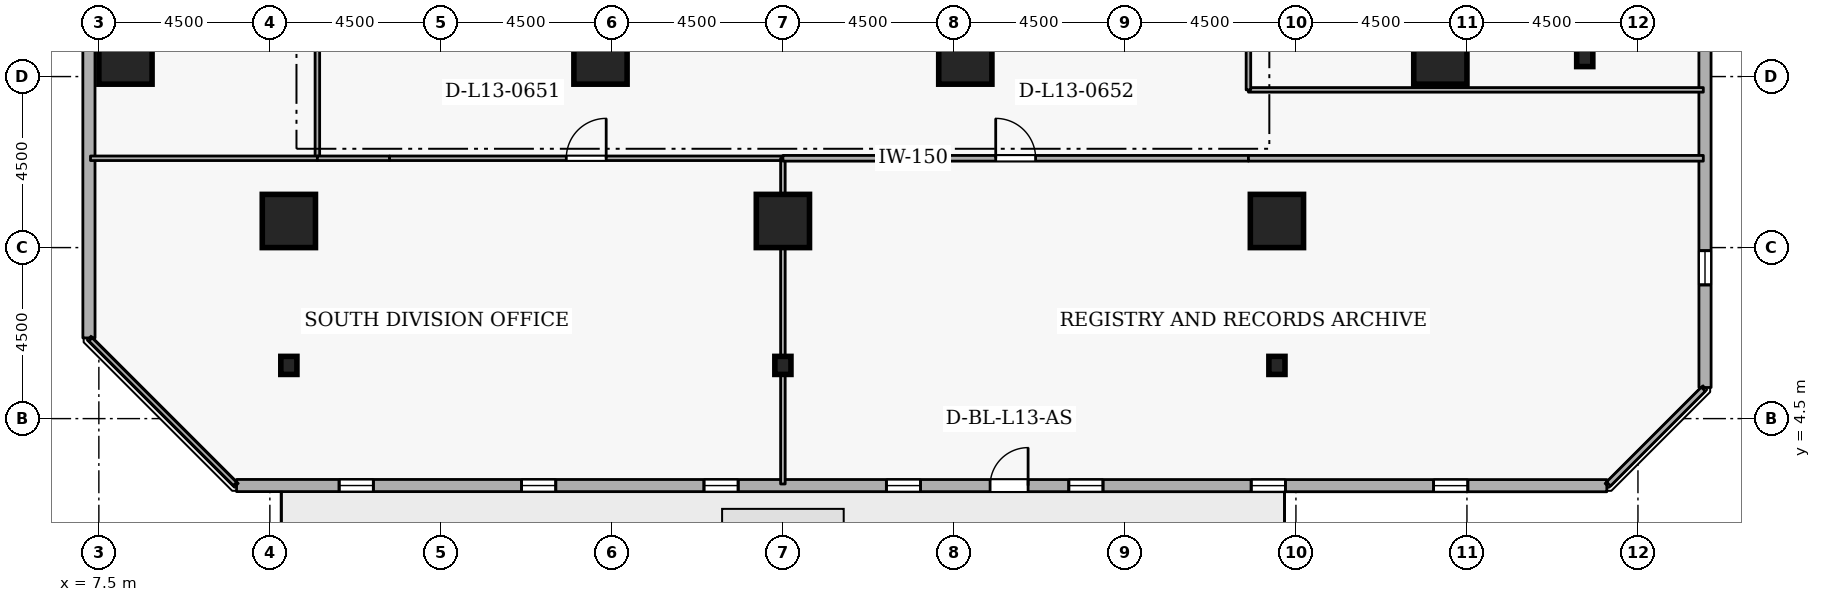
"""IFC4 building model, lengths in metres.
Left out: names, types, materials, properties, quantities, classifications, styles, units other than length and angle.
Written with IfcOpenShell. Run it as: python <this file> out.ifc"""

import sys

from ifc_helpers import new_model, si_unit, direction, frame, frame_2d, origin, origin_2d, place, context, subcontext, project, spatial, rectangle, i_section, extrude, element, fill, save


model = new_model("IFC4")
c1 = context("Model", 3, precision=1e-05, world=origin(), true_north=direction((0.0, 1.0)))
c2 = subcontext(c1, "Body", "Model", "MODEL_VIEW")
j1 = project(units=[si_unit("LENGTHUNIT", "METRE"), si_unit("PLANEANGLEUNIT", "RADIAN")], contexts=[c1])
p1 = place(None, origin())
s1 = spatial("IfcSite", under=j1, at=p1, CompositionType="ELEMENT")
p2 = place(p1, origin())
s2 = spatial("IfcBuilding", under=s1, at=p2, CompositionType="ELEMENT")
p3 = place(p2, frame((0.0, 0.0, 53.7)))
s3 = spatial("IfcBuildingStorey", under=s2, at=p3, CompositionType="ELEMENT", Elevation=53.7)
for number, where, z_axis, x_axis in (
    (1, (12.5, 9.7, 0.0), (0.0, 0.0, 1.0), (1.0, 0.0, 0.0)),
    (2, (25.5, 9.7, 0.0), (0.0, 0.0, 1.0), (1.0, 0.0, 0.0)),
    (3, (38.5, 9.7, 0.0), (0.0, 0.0, 1.0), (1.0, 0.0, 0.0)),
    (4, (42.8, 14.0, 0.0), (0.0, 0.0, 1.0), (1.0, 0.0, 0.0)),
    (5, (8.2, 14.0, 0.0), (0.0, 0.0, 1.0), (1.0, 0.0, 0.0)),
    (6, (20.7, 14.0, 0.0), (0.0, 0.0, 1.0), (1.0, 0.0, 0.0)),
    (7, (30.3, 14.0, 0.0), (0.0, 0.0, 1.0), (1.0, 0.0, 0.0)),
):
    element("IfcColumn", number, at=place(p3, frame(where, z_axis=z_axis, x_axis=x_axis)), inside=s3, PredefinedType="COLUMN", context=c2, shape_type="SweptSolid", body=[
        extrude(rectangle(XDim=1.4, YDim=1.4, at=origin_2d()), origin(), (0.0, 0.0, 1.0), 3.6),
    ])
for number, where, z_axis, x_axis in (
    (8, (12.5, 5.9, 0.0), (0.0, 0.0, 1.0), (1.0, 0.0, 0.0)),
    (9, (25.5, 5.9, 0.0), (0.0, 0.0, 1.0), (1.0, 0.0, 0.0)),
    (10, (38.5, 5.9, 0.0), (0.0, 0.0, 1.0), (1.0, 0.0, 0.0)),
    (11, (46.6, 14.0, 0.0), (0.0, 0.0, 1.0), (1.0, 0.0, 0.0)),
):
    element("IfcColumn", number, at=place(p3, frame(where, z_axis=z_axis, x_axis=x_axis)), inside=s3, PredefinedType="COLUMN", context=c2, shape_type="SweptSolid", body=[
        extrude(i_section(OverallWidth=0.424, OverallDepth=0.475, WebThickness=0.048, FlangeThickness=0.077, FilletRadius=0.015, at=origin_2d()), origin(), (0.0, 0.0, 1.0), 3.6),
    ])
p4 = place(p3, frame((11.123, 2.74, 0.0), z_axis=(0.0, 0.0, 1.0), x_axis=(0.999999992574, -0.000121872777, 0.0)))
e12 = element("IfcWall", 12, at=p4, inside=s3, PredefinedType="STANDARD", context=c2, shape_type="SweptSolid", body=[
    extrude(rectangle(XDim=36.058, YDim=0.32, at=frame_2d((18.029, 0.0))), origin(), (0.0, 0.0, 1.0), 2.7),
])
p5 = place(p4, frame((19.829, 0.0, 0.0)))
e13 = element("IfcOpeningElement", 13, at=p5, cuts=e12, PredefinedType="OPENING", context=c2, shape_type="SweptSolid", body=[
    extrude(rectangle(XDim=1.0, YDim=2.08, at=frame_2d((0.5, 1.04))), frame((0.0, 0.17, 0.0), z_axis=(0.0, -1.0, 0.0), x_axis=(1.0, 0.0, 0.0)), (0.0, 0.0, 1.0), 0.34),
])
p6 = place(p4, frame((2.7, 0.0, 0.72)))
e14 = element("IfcOpeningElement", 14, at=p6, cuts=e12, PredefinedType="OPENING", context=c2, shape_type="SweptSolid", body=[
    extrude(rectangle(XDim=0.9, YDim=1.75, at=frame_2d((0.45, 0.875))), frame((0.0, 0.17, 0.0), z_axis=(0.0, -1.0, 0.0), x_axis=(1.0, 0.0, 0.0)), (0.0, 0.0, 1.0), 0.34),
])
p7 = place(p4, frame((7.5, 0.0, 0.72)))
e15 = element("IfcOpeningElement", 15, at=p7, cuts=e12, PredefinedType="OPENING", context=c2, shape_type="SweptSolid", body=[
    extrude(rectangle(XDim=0.9, YDim=1.75, at=frame_2d((0.45, 0.875))), frame((0.0, 0.17, 0.0), z_axis=(0.0, -1.0, 0.0), x_axis=(1.0, 0.0, 0.0)), (0.0, 0.0, 1.0), 0.34),
])
p8 = place(p4, frame((12.3, 0.0, 0.72)))
e16 = element("IfcOpeningElement", 16, at=p8, cuts=e12, PredefinedType="OPENING", context=c2, shape_type="SweptSolid", body=[
    extrude(rectangle(XDim=0.9, YDim=1.75, at=frame_2d((0.45, 0.875))), frame((0.0, 0.17, 0.0), z_axis=(0.0, -1.0, 0.0), x_axis=(1.0, 0.0, 0.0)), (0.0, 0.0, 1.0), 0.34),
])
p9 = place(p4, frame((17.1, 0.0, 0.72)))
e17 = element("IfcOpeningElement", 17, at=p9, cuts=e12, PredefinedType="OPENING", context=c2, shape_type="SweptSolid", body=[
    extrude(rectangle(XDim=0.9, YDim=1.75, at=frame_2d((0.45, 0.875))), frame((0.0, 0.17, 0.0), z_axis=(0.0, -1.0, 0.0), x_axis=(1.0, 0.0, 0.0)), (0.0, 0.0, 1.0), 0.34),
])
p10 = place(p4, frame((21.9, 0.0, 0.72)))
e18 = element("IfcOpeningElement", 18, at=p10, cuts=e12, PredefinedType="OPENING", context=c2, shape_type="SweptSolid", body=[
    extrude(rectangle(XDim=0.9, YDim=1.75, at=frame_2d((0.45, 0.875))), frame((0.0, 0.17, 0.0), z_axis=(0.0, -1.0, 0.0), x_axis=(1.0, 0.0, 0.0)), (0.0, 0.0, 1.0), 0.34),
])
p11 = place(p4, frame((26.7, 0.0, 0.72)))
e19 = element("IfcOpeningElement", 19, at=p11, cuts=e12, PredefinedType="OPENING", context=c2, shape_type="SweptSolid", body=[
    extrude(rectangle(XDim=0.9, YDim=1.75, at=frame_2d((0.45, 0.875))), frame((0.0, 0.17, 0.0), z_axis=(0.0, -1.0, 0.0), x_axis=(1.0, 0.0, 0.0)), (0.0, 0.0, 1.0), 0.34),
])
p12 = place(p4, frame((31.5, 0.0, 0.72)))
e20 = element("IfcOpeningElement", 20, at=p12, cuts=e12, PredefinedType="OPENING", context=c2, shape_type="SweptSolid", body=[
    extrude(rectangle(XDim=0.9, YDim=1.75, at=frame_2d((0.45, 0.875))), frame((0.0, 0.17, 0.0), z_axis=(0.0, -1.0, 0.0), x_axis=(1.0, 0.0, 0.0)), (0.0, 0.0, 1.0), 0.34),
])
p13 = place(p3, frame((49.765, 5.319, 0.0), z_axis=(0.0, 0.0, 1.0), x_axis=(-0.000121872777, 0.999999992574, 0.0)))
e21 = element("IfcWall", 21, at=p13, inside=s3, PredefinedType="STANDARD", context=c2, shape_type="SweptSolid", body=[
    extrude(rectangle(XDim=36.058, YDim=0.32, at=frame_2d((18.029, 0.0))), origin(), (0.0, 0.0, 1.0), 2.7),
])
p14 = place(p13, frame((2.7, 0.0, 0.72)))
e22 = element("IfcOpeningElement", 22, at=p14, cuts=e21, PredefinedType="OPENING", context=c2, shape_type="SweptSolid", body=[
    extrude(rectangle(XDim=0.9, YDim=1.75, at=frame_2d((0.45, 0.875))), frame((0.0, 0.17, 0.0), z_axis=(0.0, -1.0, 0.0), x_axis=(1.0, 0.0, 0.0)), (0.0, 0.0, 1.0), 0.34),
])
p15 = place(p13, frame((12.3, 0.0, 0.72)))
e23 = element("IfcOpeningElement", 23, at=p15, cuts=e21, PredefinedType="OPENING", context=c2, shape_type="SweptSolid", body=[
    extrude(rectangle(XDim=0.9, YDim=1.75, at=frame_2d((0.45, 0.875))), frame((0.0, 0.17, 0.0), z_axis=(0.0, -1.0, 0.0), x_axis=(1.0, 0.0, 0.0)), (0.0, 0.0, 1.0), 0.34),
])
p16 = place(p13, frame((17.1, 0.0, 0.72)))
e24 = element("IfcOpeningElement", 24, at=p16, cuts=e21, PredefinedType="OPENING", context=c2, shape_type="SweptSolid", body=[
    extrude(rectangle(XDim=0.9, YDim=1.75, at=frame_2d((0.45, 0.875))), frame((0.0, 0.17, 0.0), z_axis=(0.0, -1.0, 0.0), x_axis=(1.0, 0.0, 0.0)), (0.0, 0.0, 1.0), 0.34),
])
p17 = place(p13, frame((26.7, 0.0, 0.72)))
e25 = element("IfcOpeningElement", 25, at=p17, cuts=e21, PredefinedType="OPENING", context=c2, shape_type="SweptSolid", body=[
    extrude(rectangle(XDim=0.9, YDim=1.75, at=frame_2d((0.45, 0.875))), frame((0.0, 0.17, 0.0), z_axis=(0.0, -1.0, 0.0), x_axis=(1.0, 0.0, 0.0)), (0.0, 0.0, 1.0), 0.34),
])
p18 = place(p13, frame((31.5, 0.0, 0.72)))
e26 = element("IfcOpeningElement", 26, at=p18, cuts=e21, PredefinedType="OPENING", context=c2, shape_type="SweptSolid", body=[
    extrude(rectangle(XDim=0.9, YDim=1.75, at=frame_2d((0.45, 0.875))), frame((0.0, 0.17, 0.0), z_axis=(0.0, -1.0, 0.0), x_axis=(1.0, 0.0, 0.0)), (0.0, 0.0, 1.0), 0.34),
])
p19 = place(p3, frame((7.235, 42.681, 0.0), z_axis=(0.0, 0.0, 1.0), x_axis=(0.000121872777, -0.999999992574, 0.0)))
e27 = element("IfcWall", 27, at=p19, inside=s3, PredefinedType="STANDARD", context=c2, shape_type="SweptSolid", body=[
    extrude(rectangle(XDim=36.058, YDim=0.32, at=frame_2d((18.029, 0.0))), origin(), (0.0, 0.0, 1.0), 2.7),
])
p20 = place(p19, frame((7.5, 0.0, 0.72)))
e28 = element("IfcOpeningElement", 28, at=p20, cuts=e27, PredefinedType="OPENING", context=c2, shape_type="SweptSolid", body=[
    extrude(rectangle(XDim=0.9, YDim=1.75, at=frame_2d((0.45, 0.875))), frame((0.0, 0.17, 0.0), z_axis=(0.0, -1.0, 0.0), x_axis=(1.0, 0.0, 0.0)), (0.0, 0.0, 1.0), 0.34),
])
p21 = place(p19, frame((12.3, 0.0, 0.72)))
e29 = element("IfcOpeningElement", 29, at=p21, cuts=e27, PredefinedType="OPENING", context=c2, shape_type="SweptSolid", body=[
    extrude(rectangle(XDim=0.9, YDim=1.75, at=frame_2d((0.45, 0.875))), frame((0.0, 0.17, 0.0), z_axis=(0.0, -1.0, 0.0), x_axis=(1.0, 0.0, 0.0)), (0.0, 0.0, 1.0), 0.34),
])
p22 = place(p19, frame((17.1, 0.0, 0.72)))
e30 = element("IfcOpeningElement", 30, at=p22, cuts=e27, PredefinedType="OPENING", context=c2, shape_type="SweptSolid", body=[
    extrude(rectangle(XDim=0.9, YDim=1.75, at=frame_2d((0.45, 0.875))), frame((0.0, 0.17, 0.0), z_axis=(0.0, -1.0, 0.0), x_axis=(1.0, 0.0, 0.0)), (0.0, 0.0, 1.0), 0.34),
])
p23 = place(p19, frame((21.9, 0.0, 0.72)))
e31 = element("IfcOpeningElement", 31, at=p23, cuts=e27, PredefinedType="OPENING", context=c2, shape_type="SweptSolid", body=[
    extrude(rectangle(XDim=0.9, YDim=1.75, at=frame_2d((0.45, 0.875))), frame((0.0, 0.17, 0.0), z_axis=(0.0, -1.0, 0.0), x_axis=(1.0, 0.0, 0.0)), (0.0, 0.0, 1.0), 0.34),
])
p24 = place(p19, frame((26.7, 0.0, 0.72)))
e32 = element("IfcOpeningElement", 32, at=p24, cuts=e27, PredefinedType="OPENING", context=c2, shape_type="SweptSolid", body=[
    extrude(rectangle(XDim=0.9, YDim=1.75, at=frame_2d((0.45, 0.875))), frame((0.0, 0.17, 0.0), z_axis=(0.0, -1.0, 0.0), x_axis=(1.0, 0.0, 0.0)), (0.0, 0.0, 1.0), 0.34),
])
p25 = place(p3, frame((13.25, 20.7, 0.0), z_axis=(0.0, 0.0, 1.0), x_axis=(0.0, -1.0, 0.0)))
e33 = element("IfcWall", 33, at=p25, inside=s3, PredefinedType="PARTITIONING", context=c2, shape_type="SweptSolid", body=[
    extrude(rectangle(XDim=9.35, YDim=0.12, at=frame_2d((4.675, 0.0))), origin(), (0.0, 0.0, 1.0), 3.34),
])
p26 = place(p25, frame((4.15, 0.0, 0.0)))
e34 = element("IfcOpeningElement", 34, at=p26, cuts=e33, PredefinedType="OPENING", context=c2, shape_type="SweptSolid", body=[
    extrude(rectangle(XDim=1.05, YDim=2.1, at=frame_2d((0.525, 1.05))), frame((0.0, 0.07, 0.0), z_axis=(0.0, -1.0, 0.0), x_axis=(1.0, 0.0, 0.0)), (0.0, 0.0, 1.0), 0.14),
])
p27 = place(p3, frame((13.25, 11.35, 0.0), z_axis=(0.0, 0.0, 1.0), x_axis=(-1.0, 0.0, 0.0)))
e35 = element("IfcWall", 35, at=p27, inside=s3, PredefinedType="PARTITIONING", context=c2, shape_type="SweptSolid", body=[
    extrude(rectangle(XDim=5.97, YDim=0.12, at=frame_2d((2.985, 0.0))), origin(), (0.0, 0.0, 1.0), 3.34),
])
p28 = place(p3, frame((49.72, 13.15, 0.0), z_axis=(0.0, 0.0, 1.0), x_axis=(-1.0, 0.0, 0.0)))
e36 = element("IfcWall", 36, at=p28, inside=s3, PredefinedType="PARTITIONING", context=c2, shape_type="SweptSolid", body=[
    extrude(rectangle(XDim=11.97, YDim=0.12, at=frame_2d((5.985, 0.0))), origin(), (0.0, 0.0, 1.0), 3.34),
])
p29 = place(p3, frame((37.75, 13.15, 0.0), z_axis=(0.0, 0.0, 1.0), x_axis=(0.0, 1.0, 0.0)))
e37 = element("IfcWall", 37, at=p29, inside=s3, PredefinedType="PARTITIONING", context=c2, shape_type="SweptSolid", body=[
    extrude(rectangle(XDim=1.862, YDim=0.12, at=frame_2d((0.931, 0.0))), origin(), (0.0, 0.0, 1.0), 3.34),
])
p30 = place(p3, frame((13.25, 11.35, 0.0), z_axis=(0.0, 0.0, 1.0), x_axis=(1.0, 0.0, 0.0)))
e38 = element("IfcWall", 38, at=p30, inside=s3, PredefinedType="PARTITIONING", context=c2, shape_type="SweptSolid", body=[
    extrude(rectangle(XDim=1.9, YDim=0.12, at=frame_2d((0.95, 0.0))), origin(), (0.0, 0.0, 1.0), 3.34),
])
p31 = place(p3, frame((15.15, 11.35, 0.0), z_axis=(0.0, 0.0, 1.0), x_axis=(1.0, 0.0, 0.0)))
e39 = element("IfcWall", 39, at=p31, inside=s3, PredefinedType="PARTITIONING", context=c2, shape_type="SweptSolid", body=[
    extrude(rectangle(XDim=10.35, YDim=0.12, at=frame_2d((5.175, 0.0))), origin(), (0.0, 0.0, 1.0), 3.34),
])
p32 = place(p31, frame((4.65, 0.0, 0.0)))
e40 = element("IfcOpeningElement", 40, at=p32, cuts=e39, PredefinedType="OPENING", context=c2, shape_type="SweptSolid", body=[
    extrude(rectangle(XDim=1.05, YDim=2.1, at=frame_2d((0.525, 1.05))), frame((0.0, 0.07, 0.0), z_axis=(0.0, -1.0, 0.0), x_axis=(1.0, 0.0, 0.0)), (0.0, 0.0, 1.0), 0.14),
])
p33 = place(p3, frame((25.5, 11.35, 0.0), z_axis=(0.0, 0.0, 1.0), x_axis=(0.0, -1.0, 0.0)))
e41 = element("IfcWall", 41, at=p33, inside=s3, PredefinedType="PARTITIONING", context=c2, shape_type="SweptSolid", body=[
    extrude(rectangle(XDim=8.57, YDim=0.12, at=frame_2d((4.285, 0.0))), origin(), (0.0, 0.0, 1.0), 2.932),
])
p34 = place(p3, frame((11.083, 2.78, 0.0), z_axis=(0.0, 0.0, 1.0), x_axis=(-0.707106781187, 0.707106781187, 0.0)))
e42 = element("IfcWall", 42, at=p34, inside=s3, PredefinedType="PARTITIONING", context=c2, shape_type="SweptSolid", body=[
    extrude(rectangle(XDim=5.379, YDim=0.12, at=frame_2d((2.689, 0.0))), origin(), (0.0, 0.0, 1.0), 3.34),
])
p35 = place(p3, frame((25.5, 11.35, 0.0), z_axis=(0.0, 0.0, 1.0), x_axis=(1.0, 0.0, 0.0)))
e43 = element("IfcWall", 43, at=p35, inside=s3, PredefinedType="PARTITIONING", context=c2, shape_type="SweptSolid", body=[
    extrude(rectangle(XDim=12.25, YDim=0.15, at=frame_2d((6.125, 0.0))), origin(), (0.0, 0.0, 1.0), 3.34),
])
p36 = place(p35, frame((5.6, 0.0, 0.0)))
e44 = element("IfcOpeningElement", 44, at=p36, cuts=e43, PredefinedType="OPENING", context=c2, shape_type="SweptSolid", body=[
    extrude(rectangle(XDim=1.05, YDim=2.1, at=frame_2d((0.525, 1.05))), frame((0.0, 0.085, 0.0), z_axis=(0.0, -1.0, 0.0), x_axis=(1.0, 0.0, 0.0)), (0.0, 0.0, 1.0), 0.17),
])
p37 = place(p3, frame((37.75, 11.35, 0.0), z_axis=(0.0, 0.0, 1.0), x_axis=(1.0, 0.0, 0.0)))
e45 = element("IfcWall", 45, at=p37, inside=s3, PredefinedType="PARTITIONING", context=c2, shape_type="SweptSolid", body=[
    extrude(rectangle(XDim=11.97, YDim=0.15, at=frame_2d((5.985, 0.0))), origin(), (0.0, 0.0, 1.0), 3.34),
])
p38 = place(p3, frame((49.72, 5.275, 0.0), z_axis=(0.0, 0.0, 1.0), x_axis=(-0.707106781187, -0.707106781187, 0.0)))
e46 = element("IfcWall", 46, at=p38, inside=s3, PredefinedType="PARTITIONING", context=c2, shape_type="SweptSolid", body=[
    extrude(rectangle(XDim=3.528, YDim=0.15, at=frame_2d((1.764, 0.0))), origin(), (0.0, 0.0, 1.0), 3.34),
])
p39 = place(p5, origin())
e47 = element("IfcDoor", 47, at=p39, inside=s3, OperationType="SINGLE_SWING_RIGHT", PredefinedType="DOOR", context=c2, shape_type="SweptSolid", body=[
    extrude(rectangle(XDim=1.0, YDim=2.08, at=frame_2d((0.5, 1.04))), frame((0.0, 0.025, 0.0), z_axis=(0.0, -1.0, 0.0), x_axis=(1.0, 0.0, 0.0)), (0.0, 0.0, 1.0), 0.05),
])
fill(e13, e47)
p40 = place(p6, origin())
e48 = element("IfcWindow", 48, at=p40, inside=s3, PartitioningType="SINGLE_PANEL", PredefinedType="WINDOW", context=c2, shape_type="SweptSolid", body=[
    extrude(rectangle(XDim=0.9, YDim=1.75, at=frame_2d((0.45, 0.875))), frame((0.0, 0.03, 0.0), z_axis=(0.0, -1.0, 0.0), x_axis=(1.0, 0.0, 0.0)), (0.0, 0.0, 1.0), 0.06),
])
fill(e14, e48)
p41 = place(p7, origin())
e49 = element("IfcWindow", 49, at=p41, inside=s3, PartitioningType="SINGLE_PANEL", PredefinedType="WINDOW", context=c2, shape_type="SweptSolid", body=[
    extrude(rectangle(XDim=0.9, YDim=1.75, at=frame_2d((0.45, 0.875))), frame((0.0, 0.03, 0.0), z_axis=(0.0, -1.0, 0.0), x_axis=(1.0, 0.0, 0.0)), (0.0, 0.0, 1.0), 0.06),
])
fill(e15, e49)
p42 = place(p8, origin())
e50 = element("IfcWindow", 50, at=p42, inside=s3, PartitioningType="SINGLE_PANEL", PredefinedType="WINDOW", context=c2, shape_type="SweptSolid", body=[
    extrude(rectangle(XDim=0.9, YDim=1.75, at=frame_2d((0.45, 0.875))), frame((0.0, 0.03, 0.0), z_axis=(0.0, -1.0, 0.0), x_axis=(1.0, 0.0, 0.0)), (0.0, 0.0, 1.0), 0.06),
])
fill(e16, e50)
p43 = place(p9, origin())
e51 = element("IfcWindow", 51, at=p43, inside=s3, PartitioningType="SINGLE_PANEL", PredefinedType="WINDOW", context=c2, shape_type="SweptSolid", body=[
    extrude(rectangle(XDim=0.9, YDim=1.75, at=frame_2d((0.45, 0.875))), frame((0.0, 0.03, 0.0), z_axis=(0.0, -1.0, 0.0), x_axis=(1.0, 0.0, 0.0)), (0.0, 0.0, 1.0), 0.06),
])
fill(e17, e51)
p44 = place(p10, origin())
e52 = element("IfcWindow", 52, at=p44, inside=s3, PartitioningType="SINGLE_PANEL", PredefinedType="WINDOW", context=c2, shape_type="SweptSolid", body=[
    extrude(rectangle(XDim=0.9, YDim=1.75, at=frame_2d((0.45, 0.875))), frame((0.0, 0.03, 0.0), z_axis=(0.0, -1.0, 0.0), x_axis=(1.0, 0.0, 0.0)), (0.0, 0.0, 1.0), 0.06),
])
fill(e18, e52)
p45 = place(p11, origin())
e53 = element("IfcWindow", 53, at=p45, inside=s3, PartitioningType="SINGLE_PANEL", PredefinedType="WINDOW", context=c2, shape_type="SweptSolid", body=[
    extrude(rectangle(XDim=0.9, YDim=1.75, at=frame_2d((0.45, 0.875))), frame((0.0, 0.03, 0.0), z_axis=(0.0, -1.0, 0.0), x_axis=(1.0, 0.0, 0.0)), (0.0, 0.0, 1.0), 0.06),
])
fill(e19, e53)
p46 = place(p12, origin())
e54 = element("IfcWindow", 54, at=p46, inside=s3, PartitioningType="SINGLE_PANEL", PredefinedType="WINDOW", context=c2, shape_type="SweptSolid", body=[
    extrude(rectangle(XDim=0.9, YDim=1.75, at=frame_2d((0.45, 0.875))), frame((0.0, 0.03, 0.0), z_axis=(0.0, -1.0, 0.0), x_axis=(1.0, 0.0, 0.0)), (0.0, 0.0, 1.0), 0.06),
])
fill(e20, e54)
p47 = place(p14, origin())
e55 = element("IfcWindow", 55, at=p47, inside=s3, PartitioningType="SINGLE_PANEL", PredefinedType="WINDOW", context=c2, shape_type="SweptSolid", body=[
    extrude(rectangle(XDim=0.9, YDim=1.75, at=frame_2d((0.45, 0.875))), frame((0.0, 0.03, 0.0), z_axis=(0.0, -1.0, 0.0), x_axis=(1.0, 0.0, 0.0)), (0.0, 0.0, 1.0), 0.06),
])
fill(e22, e55)
p48 = place(p32, origin())
e56 = element("IfcDoor", 56, at=p48, inside=s3, OperationType="SINGLE_SWING_RIGHT", PredefinedType="DOOR", context=c2, shape_type="SweptSolid", body=[
    extrude(rectangle(XDim=1.05, YDim=2.1, at=frame_2d((0.525, 1.05))), frame((0.0, 0.025, 0.0), z_axis=(0.0, -1.0, 0.0), x_axis=(1.0, 0.0, 0.0)), (0.0, 0.0, 1.0), 0.05),
])
fill(e40, e56)
p49 = place(p36, origin())
e57 = element("IfcDoor", 57, at=p49, inside=s3, OperationType="SINGLE_SWING_LEFT", PredefinedType="DOOR", context=c2, shape_type="SweptSolid", body=[
    extrude(rectangle(XDim=1.05, YDim=2.1, at=frame_2d((0.525, 1.05))), frame((0.0, 0.025, 0.0), z_axis=(0.0, -1.0, 0.0), x_axis=(1.0, 0.0, 0.0)), (0.0, 0.0, 1.0), 0.05),
])
fill(e44, e57)
save(model, sys.argv[1])
